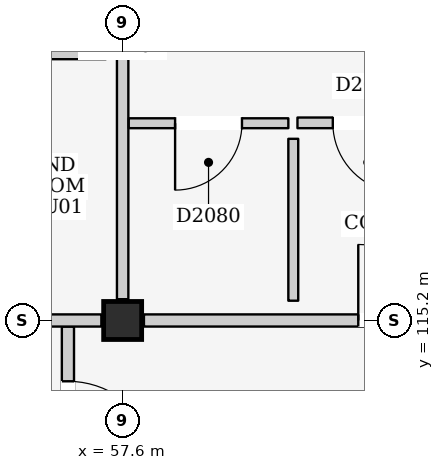
"""IFC4 building model, lengths in metres.
Left out: names, types, materials, properties, quantities, classifications, styles, units other than length and angle.
Written with IfcOpenShell. Run it as: python <this file> out.ifc"""

import sys

from ifc_helpers import new_model, si_unit, direction, frame, frame_2d, origin, origin_2d, place, context, subcontext, project, spatial, rectangle, extrude, element, fill, save


model = new_model("IFC4")
c1 = context("Model", 3, precision=1e-05, world=origin(), true_north=direction((0.0, 1.0)))
c2 = subcontext(c1, "Body", "Model", "MODEL_VIEW")
j1 = project(units=[si_unit("LENGTHUNIT", "METRE"), si_unit("PLANEANGLEUNIT", "RADIAN")], contexts=[c1])
p1 = place(None, origin())
s1 = spatial("IfcSite", under=j1, at=p1, CompositionType="ELEMENT")
p2 = place(p1, origin())
s2 = spatial("IfcBuilding", under=s1, at=p2, CompositionType="ELEMENT")
p3 = place(p2, frame((0.0, 0.0, 50.9)))
s3 = spatial("IfcBuildingStorey", under=s2, at=p3, CompositionType="ELEMENT", Elevation=50.9)
p4 = place(p3, frame((57.6, 115.2, 0.0), z_axis=(0.0, 0.0, 1.0), x_axis=(1.0, 0.0, 0.0)))
e1 = element("IfcColumn", 1, at=p4, inside=s3, PredefinedType="COLUMN", context=c2, shape_type="SweptSolid", body=[
    extrude(rectangle(XDim=0.5, YDim=0.5, at=origin_2d()), origin(), (0.0, 0.0, 1.0), 3.2),
])
p5 = place(p3, frame((56.88, 111.1, 0.0), z_axis=(0.0, 0.0, 1.0), x_axis=(0.0, 1.0, 0.0)))
e2 = element("IfcWall", 2, at=p5, inside=s3, PredefinedType="PARTITIONING", context=c2, shape_type="SweptSolid", body=[
    extrude(rectangle(XDim=4.02, YDim=0.16, at=frame_2d((2.01, 0.0))), origin(), (0.0, 0.0, 1.0), 2.96),
])
p6 = place(p5, frame((2.1, 0.0, 0.0)))
e3 = element("IfcOpeningElement", 3, at=p6, cuts=e2, PredefinedType="OPENING", context=c2, shape_type="SweptSolid", body=[
    extrude(rectangle(XDim=1.2, YDim=2.2, at=frame_2d((0.6, 1.1))), frame((0.0, 0.095, 0.0), z_axis=(0.0, -1.0, 0.0), x_axis=(1.0, 0.0, 0.0)), (0.0, 0.0, 1.0), 0.19),
])
p7 = place(p3, frame((50.68, 115.2, 0.0), z_axis=(0.0, 0.0, 1.0), x_axis=(1.0, 0.0, 0.0)))
e4 = element("IfcWall", 4, at=p7, inside=s3, PredefinedType="PARTITIONING", context=c2, shape_type="SweptSolid", body=[
    extrude(rectangle(XDim=6.64, YDim=0.16, at=frame_2d((3.32, 0.0))), origin(), (0.0, 0.0, 1.0), 2.295),
])
p8 = place(p3, frame((57.6, 115.48, 0.0), z_axis=(0.0, 0.0, 1.0), x_axis=(0.0, 1.0, 0.0)))
e5 = element("IfcWall", 5, at=p8, inside=s3, PredefinedType="PARTITIONING", context=c2, shape_type="SweptSolid", body=[
    extrude(rectangle(XDim=6.64, YDim=0.15, at=frame_2d((3.32, 0.0))), origin(), (0.0, 0.0, 1.0), 2.445),
])
p9 = place(p3, frame((54.32, 118.7, 0.0), z_axis=(0.0, 0.0, 1.0), x_axis=(1.0, 0.0, 0.0)))
e6 = element("IfcWall", 6, at=p9, inside=s3, PredefinedType="PARTITIONING", context=c2, shape_type="SweptSolid", body=[
    extrude(rectangle(XDim=3.06, YDim=0.125, at=frame_2d((1.53, 0.0))), origin(), (0.0, 0.0, 1.0), 2.96),
])
p10 = place(p3, frame((57.88, 115.2, 0.0), z_axis=(0.0, 0.0, 1.0), x_axis=(1.0, 0.0, 0.0)))
e7 = element("IfcWall", 7, at=p10, inside=s3, PredefinedType="PARTITIONING", context=c2, shape_type="SweptSolid", body=[
    extrude(rectangle(XDim=6.64, YDim=0.16, at=frame_2d((3.32, 0.0))), origin(), (0.0, 0.0, 1.0), 2.295),
])
p11 = place(p10, frame((2.82, 0.0, 0.0)))
e8 = element("IfcOpeningElement", 8, at=p11, cuts=e7, PredefinedType="OPENING", context=c2, shape_type="SweptSolid", body=[
    extrude(rectangle(XDim=1.0, YDim=2.15, at=frame_2d((0.5, 1.075))), frame((0.0, 0.095, 0.0), z_axis=(0.0, -1.0, 0.0), x_axis=(1.0, 0.0, 0.0)), (0.0, 0.0, 1.0), 0.19),
])
p12 = place(p3, frame((57.68, 117.795, 0.0), z_axis=(0.0, 0.0, 1.0), x_axis=(1.0, 0.0, 0.0)))
e9 = element("IfcWall", 9, at=p12, inside=s3, PredefinedType="PARTITIONING", context=c2, shape_type="SweptSolid", body=[
    extrude(rectangle(XDim=2.1, YDim=0.13, at=frame_2d((1.05, 0.0))), origin(), (0.0, 0.0, 1.0), 2.96),
])
p13 = place(p12, frame((0.61, 0.0, 0.0)))
e10 = element("IfcOpeningElement", 10, at=p13, cuts=e9, PredefinedType="OPENING", context=c2, shape_type="SweptSolid", body=[
    extrude(rectangle(XDim=0.88, YDim=2.1, at=frame_2d((0.44, 1.05))), frame((0.0, 0.08, 0.0), z_axis=(0.0, -1.0, 0.0), x_axis=(1.0, 0.0, 0.0)), (0.0, 0.0, 1.0), 0.16),
])
p14 = place(p3, frame((59.845, 115.46, 0.0), z_axis=(0.0, 0.0, 1.0), x_axis=(0.0, 1.0, 0.0)))
e11 = element("IfcWall", 11, at=p14, inside=s3, PredefinedType="PARTITIONING", context=c2, shape_type="SweptSolid", body=[
    extrude(rectangle(XDim=2.13, YDim=0.13, at=frame_2d((1.065, 0.0))), origin(), (0.0, 0.0, 1.0), 2.96),
])
p15 = place(p3, frame((59.9, 117.8, 0.0), z_axis=(0.0, 0.0, 1.0), x_axis=(1.0, 0.0, 0.0)))
e12 = element("IfcWall", 12, at=p15, inside=s3, PredefinedType="PARTITIONING", context=c2, shape_type="SweptSolid", body=[
    extrude(rectangle(XDim=1.85, YDim=0.14, at=frame_2d((0.925, 0.0))), origin(), (0.0, 0.0, 1.0), 2.96),
])
p16 = place(p15, frame((0.465, 0.0, 0.0)))
e13 = element("IfcOpeningElement", 13, at=p16, cuts=e12, PredefinedType="OPENING", context=c2, shape_type="SweptSolid", body=[
    extrude(rectangle(XDim=0.92, YDim=2.1, at=frame_2d((0.46, 1.05))), frame((0.0, 0.085, 0.0), z_axis=(0.0, -1.0, 0.0), x_axis=(1.0, 0.0, 0.0)), (0.0, 0.0, 1.0), 0.17),
])
p17 = place(p6, frame((1.2, 0.0, 0.0), z_axis=(0.0, 0.0, 1.0), x_axis=(-1.0, 0.0, 0.0)))
e14 = element("IfcDoor", 14, at=p17, inside=s3, OperationType="SINGLE_SWING_RIGHT", PredefinedType="DOOR", context=c2, shape_type="SweptSolid", body=[
    extrude(rectangle(XDim=1.2, YDim=2.2, at=frame_2d((0.6, 1.1))), frame((0.0, 0.025, 0.0), z_axis=(0.0, -1.0, 0.0), x_axis=(1.0, 0.0, 0.0)), (0.0, 0.0, 1.0), 0.05),
])
fill(e3, e14)
p18 = place(p11, origin())
e15 = element("IfcDoor", 15, at=p18, inside=s3, OperationType="SINGLE_SWING_LEFT", PredefinedType="DOOR", context=c2, shape_type="SweptSolid", body=[
    extrude(rectangle(XDim=1.0, YDim=2.15, at=frame_2d((0.5, 1.075))), frame((0.0, 0.025, 0.0), z_axis=(0.0, -1.0, 0.0), x_axis=(1.0, 0.0, 0.0)), (0.0, 0.0, 1.0), 0.05),
])
fill(e8, e15)
p19 = place(p13, frame((0.88, 0.0, 0.0), z_axis=(0.0, 0.0, 1.0), x_axis=(-1.0, 0.0, 0.0)))
e16 = element("IfcDoor", 16, at=p19, inside=s3, OperationType="SINGLE_SWING_RIGHT", PredefinedType="DOOR", context=c2, shape_type="SweptSolid", body=[
    extrude(rectangle(XDim=0.88, YDim=2.1, at=frame_2d((0.44, 1.05))), frame((0.0, 0.025, 0.0), z_axis=(0.0, -1.0, 0.0), x_axis=(1.0, 0.0, 0.0)), (0.0, 0.0, 1.0), 0.05),
])
fill(e10, e16)
p20 = place(p16, frame((0.92, 0.0, 0.0), z_axis=(0.0, 0.0, 1.0), x_axis=(-1.0, 0.0, 0.0)))
e17 = element("IfcDoor", 17, at=p20, inside=s3, OperationType="SINGLE_SWING_LEFT", PredefinedType="DOOR", context=c2, shape_type="SweptSolid", body=[
    extrude(rectangle(XDim=0.92, YDim=2.1, at=frame_2d((0.46, 1.05))), frame((0.0, 0.025, 0.0), z_axis=(0.0, -1.0, 0.0), x_axis=(1.0, 0.0, 0.0)), (0.0, 0.0, 1.0), 0.05),
])
fill(e13, e17)
save(model, sys.argv[1])
